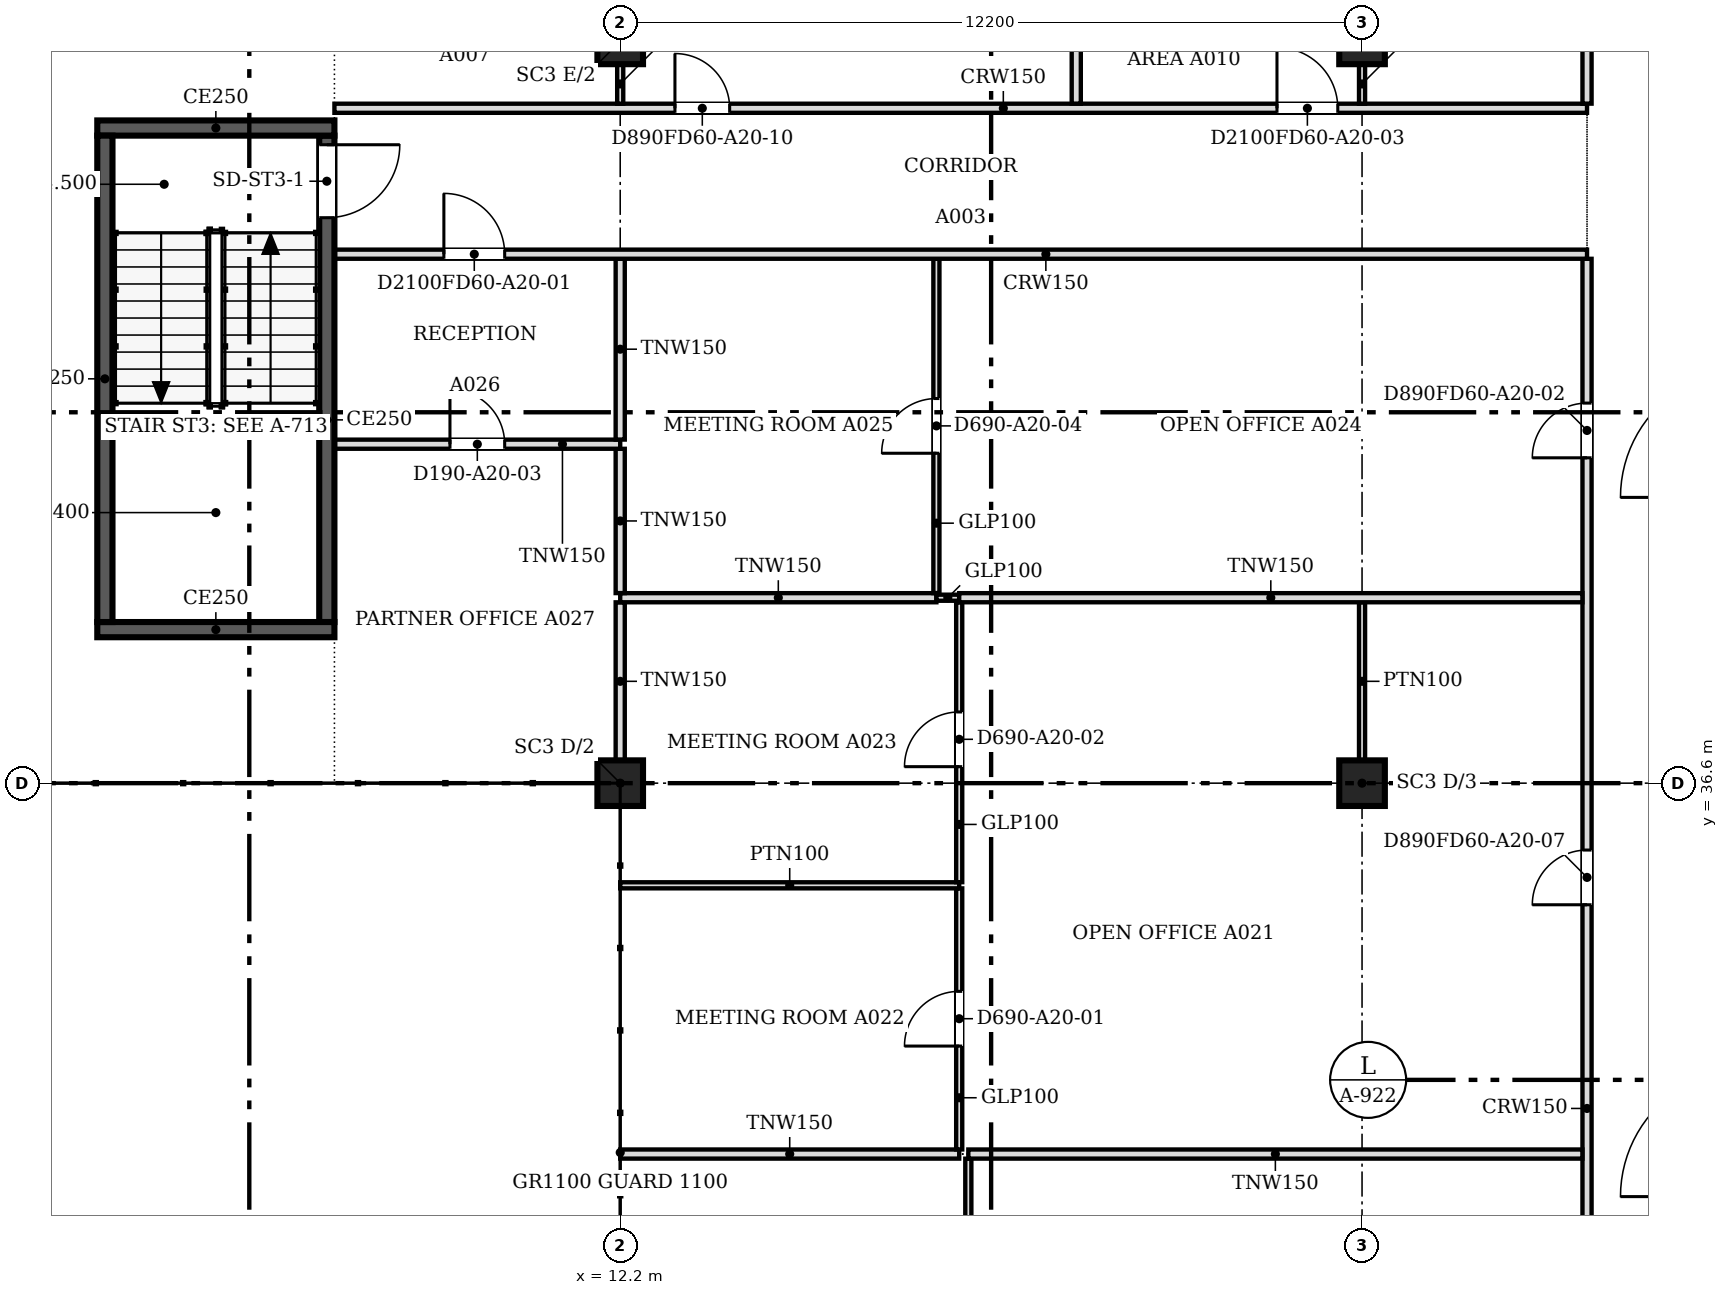
"""IFC4 building model, lengths in metres.
Left out: names, types, materials, properties, quantities, classifications, styles, units other than length and angle.
Written with IfcOpenShell. Run it as: python <this file> out.ifc"""

import sys

from ifc_helpers import new_model, si_unit, direction, frame, frame_2d, origin, origin_2d, place, context, subcontext, project, spatial, rectangle, extrude, source, transform, mapped, element, fill, save


model = new_model("IFC4")
c1 = context("Model", 3, precision=1e-05, world=origin(), true_north=direction((0.0, 1.0)))
c2 = subcontext(c1, "Body", "Model", "MODEL_VIEW")
j1 = project(units=[si_unit("LENGTHUNIT", "METRE"), si_unit("PLANEANGLEUNIT", "RADIAN")], contexts=[c1])
p1 = place(None, origin())
s1 = spatial("IfcSite", under=j1, at=p1, CompositionType="ELEMENT")
p2 = place(p1, origin())
s2 = spatial("IfcBuilding", under=s1, at=p2, CompositionType="ELEMENT")
p3 = place(p2, frame((0.0, 0.0, 220.7)))
s3 = spatial("IfcBuildingStorey", under=s2, at=p3, CompositionType="ELEMENT", Elevation=220.7)
for number, where, z_axis, x_axis in (
    (1, (12.2, 36.6, 0.0), (0.0, 0.0, 1.0), (1.0, 0.0, 0.0)),
    (2, (12.2, 48.8, 0.0), (0.0, 0.0, 1.0), (1.0, 0.0, 0.0)),
    (3, (24.4, 36.6, 0.0), (0.0, 0.0, 1.0), (1.0, 0.0, 0.0)),
    (4, (24.4, 48.8, 0.0), (0.0, 0.0, 1.0), (1.0, 0.0, 0.0)),
):
    element("IfcColumn", number, at=place(p3, frame(where, z_axis=z_axis, x_axis=x_axis)), inside=s3, PredefinedType="COLUMN", context=c2, shape_type="SweptSolid", body=[
        extrude(rectangle(XDim=0.75, YDim=0.75, at=origin_2d()), origin(), (0.0, 0.0, 1.0), 3.6),
    ])
p4 = place(p3, frame((7.5, 39.125, 0.0), z_axis=(0.0, 0.0, 1.0), x_axis=(-1.0, 0.0, 0.0)))
e5 = element("IfcWall", 5, at=p4, inside=s3, PredefinedType="SOLIDWALL", context=c2, shape_type="SweptSolid", body=[
    extrude(rectangle(XDim=3.9, YDim=0.25, at=frame_2d((1.95, 0.0))), origin(), (0.0, 0.0, 1.0), 3.8),
])
p5 = place(p3, frame((3.725, 39.25, 0.0), z_axis=(0.0, 0.0, 1.0), x_axis=(0.0, 1.0, 0.0)))
e6 = element("IfcWall", 6, at=p5, inside=s3, PredefinedType="SOLIDWALL", context=c2, shape_type="SweptSolid", body=[
    extrude(rectangle(XDim=8.0, YDim=0.25, at=frame_2d((4.0, 0.0))), origin(), (0.0, 0.0, 1.0), 3.8),
])
p6 = place(p3, frame((3.6, 47.375, 0.0), z_axis=(0.0, 0.0, 1.0), x_axis=(1.0, 0.0, 0.0)))
e7 = element("IfcWall", 7, at=p6, inside=s3, PredefinedType="SOLIDWALL", context=c2, shape_type="SweptSolid", body=[
    extrude(rectangle(XDim=3.9, YDim=0.25, at=frame_2d((1.95, 0.0))), origin(), (0.0, 0.0, 1.0), 3.8),
])
p7 = place(p3, frame((7.375, 47.25, 0.0), z_axis=(0.0, 0.0, 1.0), x_axis=(0.0, -1.0, 0.0)))
e8 = element("IfcWall", 8, at=p7, inside=s3, PredefinedType="SOLIDWALL", context=c2, shape_type="SweptSolid", body=[
    extrude(rectangle(XDim=8.0, YDim=0.25, at=frame_2d((4.0, 0.0))), origin(), (0.0, 0.0, 1.0), 3.8),
])
m1 = source(origin(), c2, "Body", "SweptSolid", [
    extrude(rectangle(XDim=1.2, YDim=2.1, at=frame_2d((0.6, 1.05))), frame((0.0, 0.135, 0.0), z_axis=(0.0, -1.0, 0.0), x_axis=(1.0, 0.0, 0.0)), (0.0, 0.0, 1.0), 0.27),
])
p8 = place(p7, frame((0.15, 0.0, 0.0)))
e9 = element("IfcOpeningElement", 9, at=p8, cuts=e8, PredefinedType="OPENING", context=c2, shape_type="MappedRepresentation", body=[
    mapped(m1, transform((0.0, 0.0, 0.0), scale=1.0)),
])
p9 = place(p3, frame((28.1, 18.8, 0.0), z_axis=(0.0, 0.0, 1.0), x_axis=(0.0, 1.0, 0.0)))
e10 = element("IfcWall", 10, at=p9, inside=s3, PredefinedType="PARTITIONING", context=c2, shape_type="SweptSolid", body=[
    extrude(rectangle(XDim=26.424, YDim=0.15, at=frame_2d((13.212, 0.0))), origin(), (0.0, 0.0, 1.0), 3.067),
])
m2 = source(origin(), c2, "Body", "SweptSolid", [
    extrude(rectangle(XDim=0.9, YDim=2.1, at=frame_2d((0.45, 1.05))), frame((0.0, 0.085, 0.0), z_axis=(0.0, -1.0, 0.0), x_axis=(1.0, 0.0, 0.0)), (0.0, 0.0, 1.0), 0.17),
])
p10 = place(p9, frame((1.1, 0.0, 0.0)))
e11 = element("IfcOpeningElement", 11, at=p10, cuts=e10, PredefinedType="OPENING", context=c2, shape_type="MappedRepresentation", body=[
    mapped(m2, transform((0.0, 0.0, 0.0), scale=1.0)),
])
p11 = place(p9, frame((23.151, 0.0, 0.0)))
e12 = element("IfcOpeningElement", 12, at=p11, cuts=e10, PredefinedType="OPENING", context=c2, shape_type="MappedRepresentation", body=[
    mapped(m2, transform((0.0, 0.0, 0.0), scale=1.0)),
])
p12 = place(p9, frame((8.2, 0.0, 0.0)))
e13 = element("IfcOpeningElement", 13, at=p12, cuts=e10, PredefinedType="OPENING", context=c2, shape_type="MappedRepresentation", body=[
    mapped(m2, transform((0.0, 0.0, 0.0), scale=1.0)),
])
p13 = place(p9, frame((15.8, 0.0, 0.0)))
e14 = element("IfcOpeningElement", 14, at=p13, cuts=e10, PredefinedType="OPENING", context=c2, shape_type="MappedRepresentation", body=[
    mapped(m2, transform((0.0, 0.0, 0.0), scale=1.0)),
])
p14 = place(p3, frame((17.925, 24.476, 0.0), z_axis=(0.0, 0.0, 1.0), x_axis=(0.0, 1.0, 0.0)))
e15 = element("IfcWall", 15, at=p14, inside=s3, PredefinedType="PARTITIONING", context=c2, shape_type="SweptSolid", body=[
    extrude(rectangle(XDim=5.948, YDim=0.1, at=frame_2d((2.974, 0.0))), origin(), (0.0, 0.0, 1.0), 3.067),
])
m3 = source(origin(), c2, "Body", "SweptSolid", [
    extrude(rectangle(XDim=0.9, YDim=2.1, at=frame_2d((0.45, 1.05))), frame((0.0, 0.06, 0.0), z_axis=(0.0, -1.0, 0.0), x_axis=(1.0, 0.0, 0.0)), (0.0, 0.0, 1.0), 0.12),
])
p15 = place(p14, frame((2.5, 0.0, 0.0)))
e16 = element("IfcOpeningElement", 16, at=p15, cuts=e15, PredefinedType="OPENING", context=c2, shape_type="MappedRepresentation", body=[
    mapped(m3, transform((0.0, 0.0, 0.0), scale=1.0)),
])
p16 = place(p3, frame((12.2, 30.5, 0.0), z_axis=(0.0, 0.0, 1.0), x_axis=(1.0, 0.0, 0.0)))
e17 = element("IfcWall", 17, at=p16, inside=s3, PredefinedType="PARTITIONING", context=c2, shape_type="SweptSolid", body=[
    extrude(rectangle(XDim=5.575, YDim=0.15, at=frame_2d((2.788, 0.0))), origin(), (0.0, 0.0, 1.0), 3.067),
])
p17 = place(p3, frame((17.925, 30.5, 0.0), z_axis=(0.0, 0.0, 1.0), x_axis=(1.0, 0.0, 0.0)))
e18 = element("IfcWall", 18, at=p17, inside=s3, PredefinedType="PARTITIONING", context=c2, shape_type="SweptSolid", body=[
    extrude(rectangle(XDim=10.099, YDim=0.15, at=frame_2d((5.049, 0.0))), origin(), (0.0, 0.0, 1.0), 3.067),
])
p18 = place(p3, frame((17.775, 30.576, 0.0), z_axis=(0.0, 0.0, 1.0), x_axis=(0.0, 1.0, 0.0)))
e19 = element("IfcWall", 19, at=p18, inside=s3, PredefinedType="PARTITIONING", context=c2, shape_type="SweptSolid", body=[
    extrude(rectangle(XDim=4.293, YDim=0.1, at=frame_2d((2.147, 0.0))), origin(), (0.0, 0.0, 1.0), 3.067),
])
p19 = place(p18, frame((1.7, 0.0, 0.0)))
e20 = element("IfcOpeningElement", 20, at=p19, cuts=e19, PredefinedType="OPENING", context=c2, shape_type="MappedRepresentation", body=[
    mapped(m3, transform((0.0, 0.0, 0.0), scale=1.0)),
])
p20 = place(p3, frame((12.2, 34.92, 0.0), z_axis=(0.0, 0.0, 1.0), x_axis=(1.0, 0.0, 0.0)))
e21 = element("IfcWall", 21, at=p20, inside=s3, PredefinedType="PARTITIONING", context=c2, shape_type="SweptSolid", body=[
    extrude(rectangle(XDim=5.575, YDim=0.1, at=frame_2d((2.788, 0.0))), origin(), (0.0, 0.0, 1.0), 3.067),
])
p21 = place(p3, frame((17.775, 34.971, 0.0), z_axis=(0.0, 0.0, 1.0), x_axis=(0.0, 1.0, 0.0)))
e22 = element("IfcWall", 22, at=p21, inside=s3, PredefinedType="PARTITIONING", context=c2, shape_type="SweptSolid", body=[
    extrude(rectangle(XDim=4.603, YDim=0.1, at=frame_2d((2.301, 0.0))), origin(), (0.0, 0.0, 1.0), 3.067),
])
p22 = place(p21, frame((1.9, 0.0, 0.0)))
e23 = element("IfcOpeningElement", 23, at=p22, cuts=e22, PredefinedType="OPENING", context=c2, shape_type="MappedRepresentation", body=[
    mapped(m3, transform((0.0, 0.0, 0.0), scale=1.0)),
])
p23 = place(p3, frame((12.2, 36.976, 0.0), z_axis=(0.0, 0.0, 1.0), x_axis=(0.0, 1.0, 0.0)))
e24 = element("IfcWall", 24, at=p23, inside=s3, PredefinedType="PARTITIONING", context=c2, shape_type="SweptSolid", body=[
    extrude(rectangle(XDim=2.598, YDim=0.15, at=frame_2d((1.299, 0.0))), origin(), (0.0, 0.0, 1.0), 3.067),
])
p24 = place(p3, frame((24.4, 36.975, 0.0), z_axis=(0.0, 0.0, 1.0), x_axis=(0.0, 1.0, 0.0)))
e25 = element("IfcWall", 25, at=p24, inside=s3, PredefinedType="PARTITIONING", context=c2, shape_type="SweptSolid", body=[
    extrude(rectangle(XDim=2.6, YDim=0.1, at=frame_2d((1.3, 0.0))), origin(), (0.0, 0.0, 1.0), 3.067),
])
p25 = place(p3, frame((12.2, 39.65, 0.0), z_axis=(0.0, 0.0, 1.0), x_axis=(1.0, 0.0, 0.0)))
e26 = element("IfcWall", 26, at=p25, inside=s3, PredefinedType="PARTITIONING", context=c2, shape_type="SweptSolid", body=[
    extrude(rectangle(XDim=5.2, YDim=0.15, at=frame_2d((2.6, 0.0))), origin(), (0.0, 0.0, 1.0), 3.067),
])
p26 = place(p3, frame((17.401, 39.65, 0.0), z_axis=(0.0, 0.0, 1.0), x_axis=(1.0, 0.0, 0.0)))
e27 = element("IfcWall", 27, at=p26, inside=s3, PredefinedType="PARTITIONING", context=c2, shape_type="SweptSolid", body=[
    extrude(rectangle(XDim=0.373, YDim=0.1, at=frame_2d((0.187, 0.0))), origin(), (0.0, 0.0, 1.0), 3.067),
])
p27 = place(p3, frame((17.775, 39.65, 0.0), z_axis=(0.0, 0.0, 1.0), x_axis=(1.0, 0.0, 0.0)))
e28 = element("IfcWall", 28, at=p27, inside=s3, PredefinedType="PARTITIONING", context=c2, shape_type="SweptSolid", body=[
    extrude(rectangle(XDim=10.249, YDim=0.15, at=frame_2d((5.125, 0.0))), origin(), (0.0, 0.0, 1.0), 3.067),
])
p28 = place(p3, frame((12.2, 39.726, 0.0), z_axis=(0.0, 0.0, 1.0), x_axis=(0.0, 1.0, 0.0)))
e29 = element("IfcWall", 29, at=p28, inside=s3, PredefinedType="PARTITIONING", context=c2, shape_type="SweptSolid", body=[
    extrude(rectangle(XDim=2.373, YDim=0.15, at=frame_2d((1.187, 0.0))), origin(), (0.0, 0.0, 1.0), 3.067),
])
p29 = place(p3, frame((17.4, 39.726, 0.0), z_axis=(0.0, 0.0, 1.0), x_axis=(0.0, 1.0, 0.0)))
e30 = element("IfcWall", 30, at=p29, inside=s3, PredefinedType="PARTITIONING", context=c2, shape_type="SweptSolid", body=[
    extrude(rectangle(XDim=5.498, YDim=0.1, at=frame_2d((2.749, 0.0))), origin(), (0.0, 0.0, 1.0), 3.067),
])
p30 = place(p29, frame((2.3, 0.0, 0.0)))
e31 = element("IfcOpeningElement", 31, at=p30, cuts=e30, PredefinedType="OPENING", context=c2, shape_type="MappedRepresentation", body=[
    mapped(m3, transform((0.0, 0.0, 0.0), scale=1.0)),
])
p31 = place(p3, frame((12.2, 42.175, 0.0), z_axis=(0.0, 0.0, 1.0), x_axis=(-1.0, 0.0, 0.0)))
e32 = element("IfcWall", 32, at=p31, inside=s3, PredefinedType="PARTITIONING", context=c2, shape_type="SweptSolid", body=[
    extrude(rectangle(XDim=4.7, YDim=0.15, at=frame_2d((2.35, 0.0))), origin(), (0.0, 0.0, 1.0), 3.067),
])
p32 = place(p31, frame((1.9, 0.0, 0.0)))
e33 = element("IfcOpeningElement", 33, at=p32, cuts=e32, PredefinedType="OPENING", context=c2, shape_type="MappedRepresentation", body=[
    mapped(m2, transform((0.0, 0.0, 0.0), scale=1.0)),
])
p33 = place(p3, frame((12.2, 42.251, 0.0), z_axis=(0.0, 0.0, 1.0), x_axis=(0.0, 1.0, 0.0)))
e34 = element("IfcWall", 34, at=p33, inside=s3, PredefinedType="PARTITIONING", context=c2, shape_type="SweptSolid", body=[
    extrude(rectangle(XDim=2.973, YDim=0.15, at=frame_2d((1.487, 0.0))), origin(), (0.0, 0.0, 1.0), 3.067),
])
p34 = place(p3, frame((28.1, 45.3, 0.0), z_axis=(0.0, 0.0, 1.0), x_axis=(-1.0, 0.0, 0.0)))
e35 = element("IfcWall", 35, at=p34, inside=s3, PredefinedType="PARTITIONING", context=c2, shape_type="SweptSolid", body=[
    extrude(rectangle(XDim=20.6, YDim=0.15, at=frame_2d((10.3, 0.0))), origin(), (0.0, 0.0, 1.0), 3.067),
])
m4 = source(origin(), c2, "Body", "SweptSolid", [
    extrude(rectangle(XDim=1.0, YDim=2.1, at=frame_2d((0.5, 1.05))), frame((0.0, 0.085, 0.0), z_axis=(0.0, -1.0, 0.0), x_axis=(1.0, 0.0, 0.0)), (0.0, 0.0, 1.0), 0.17),
])
p35 = place(p34, frame((17.8, 0.0, 0.0)))
e36 = element("IfcOpeningElement", 36, at=p35, cuts=e35, PredefinedType="OPENING", context=c2, shape_type="MappedRepresentation", body=[
    mapped(m4, transform((0.0, 0.0, 0.0), scale=1.0)),
])
p36 = place(p3, frame((7.5, 47.7, 0.0), z_axis=(0.0, 0.0, 1.0), x_axis=(1.0, 0.0, 0.0)))
e37 = element("IfcWall", 37, at=p36, inside=s3, PredefinedType="PARTITIONING", context=c2, shape_type="SweptSolid", body=[
    extrude(rectangle(XDim=20.6, YDim=0.15, at=frame_2d((10.3, 0.0))), origin(), (0.0, 0.0, 1.0), 3.067),
])
p37 = place(p36, frame((15.501, 0.0, 0.0)))
e38 = element("IfcOpeningElement", 38, at=p37, cuts=e37, PredefinedType="OPENING", context=c2, shape_type="MappedRepresentation", body=[
    mapped(m4, transform((0.0, 0.0, 0.0), scale=1.0)),
])
p38 = place(p36, frame((5.6, 0.0, 0.0)))
e39 = element("IfcOpeningElement", 39, at=p38, cuts=e37, PredefinedType="OPENING", context=c2, shape_type="MappedRepresentation", body=[
    mapped(m2, transform((0.0, 0.0, 0.0), scale=1.0)),
])
p39 = place(p3, frame((19.7, 47.776, 0.0), z_axis=(0.0, 0.0, 1.0), x_axis=(0.0, 1.0, 0.0)))
e40 = element("IfcWall", 40, at=p39, inside=s3, PredefinedType="PARTITIONING", context=c2, shape_type="SweptSolid", body=[
    extrude(rectangle(XDim=2.698, YDim=0.15, at=frame_2d((1.349, 0.0))), origin(), (0.0, 0.0, 1.0), 3.067),
])
p40 = place(p3, frame((28.1, 47.776, 0.0), z_axis=(0.0, 0.0, 1.0), x_axis=(0.0, 1.0, 0.0)))
e41 = element("IfcWall", 41, at=p40, inside=s3, PredefinedType="PARTITIONING", context=c2, shape_type="SweptSolid", body=[
    extrude(rectangle(XDim=3.348, YDim=0.15, at=frame_2d((1.674, 0.0))), origin(), (0.0, 0.0, 1.0), 3.067),
])
for number, where, z_axis, x_axis in (
    (42, (12.2, 48.425, 0.0), (0.0, 0.0, 1.0), (0.0, -1.0, 0.0)),
    (43, (24.4, 48.425, 0.0), (0.0, 0.0, 1.0), (0.0, -1.0, 0.0)),
):
    element("IfcWall", number, at=place(p3, frame(where, z_axis=z_axis, x_axis=x_axis)), inside=s3, PredefinedType="PARTITIONING", context=c2, shape_type="SweptSolid", body=[
        extrude(rectangle(XDim=0.65, YDim=0.1, at=frame_2d((0.325, 0.0))), origin(), (0.0, 0.0, 1.0), 3.067),
    ])
m5 = source(origin(), c2, "Body", "SweptSolid", [
    extrude(rectangle(XDim=1.2, YDim=2.1, at=frame_2d((0.6, 1.05))), frame((0.0, 0.025, 0.0), z_axis=(0.0, -1.0, 0.0), x_axis=(1.0, 0.0, 0.0)), (0.0, 0.0, 1.0), 0.05),
])
p41 = place(p8, origin())
e44 = element("IfcDoor", 44, at=p41, inside=s3, OperationType="SINGLE_SWING_LEFT", PredefinedType="DOOR", context=c2, shape_type="MappedRepresentation", body=[
    mapped(m5, transform((0.0, 0.0, 0.0), scale=1.0)),
])
fill(e9, e44)
m6 = source(origin(), c2, "Body", "SweptSolid", [
    extrude(rectangle(XDim=0.9, YDim=2.1, at=frame_2d((0.45, 1.05))), frame((0.0, 0.025, 0.0), z_axis=(0.0, -1.0, 0.0), x_axis=(1.0, 0.0, 0.0)), (0.0, 0.0, 1.0), 0.05),
])
p42 = place(p19, origin())
e45 = element("IfcDoor", 45, at=p42, inside=s3, OperationType="SINGLE_SWING_LEFT", PredefinedType="DOOR", context=c2, shape_type="MappedRepresentation", body=[
    mapped(m6, transform((0.0, 0.0, 0.0), scale=1.0)),
])
fill(e20, e45)
p43 = place(p22, origin())
e46 = element("IfcDoor", 46, at=p43, inside=s3, OperationType="SINGLE_SWING_LEFT", PredefinedType="DOOR", context=c2, shape_type="MappedRepresentation", body=[
    mapped(m6, transform((0.0, 0.0, 0.0), scale=1.0)),
])
fill(e23, e46)
m7 = source(origin(), c2, "Body", "SweptSolid", [
    extrude(rectangle(XDim=1.0, YDim=2.1, at=frame_2d((0.5, 1.05))), frame((0.0, 0.025, 0.0), z_axis=(0.0, -1.0, 0.0), x_axis=(1.0, 0.0, 0.0)), (0.0, 0.0, 1.0), 0.05),
])
p44 = place(p35, origin())
e47 = element("IfcDoor", 47, at=p44, inside=s3, OperationType="SINGLE_SWING_RIGHT", PredefinedType="DOOR", context=c2, shape_type="MappedRepresentation", body=[
    mapped(m7, transform((0.0, 0.0, 0.0), scale=1.0)),
])
fill(e36, e47)
p45 = place(p32, origin())
e48 = element("IfcDoor", 48, at=p45, inside=s3, OperationType="SINGLE_SWING_RIGHT", PredefinedType="DOOR", context=c2, shape_type="MappedRepresentation", body=[
    mapped(m6, transform((0.0, 0.0, 0.0), scale=1.0)),
])
fill(e33, e48)
p46 = place(p30, origin())
e49 = element("IfcDoor", 49, at=p46, inside=s3, OperationType="SINGLE_SWING_LEFT", PredefinedType="DOOR", context=c2, shape_type="MappedRepresentation", body=[
    mapped(m6, transform((0.0, 0.0, 0.0), scale=1.0)),
])
fill(e31, e49)
p47 = place(p11, origin())
e50 = element("IfcDoor", 50, at=p47, inside=s3, OperationType="SINGLE_SWING_LEFT", PredefinedType="DOOR", context=c2, shape_type="MappedRepresentation", body=[
    mapped(m6, transform((0.0, 0.0, 0.0), scale=1.0)),
])
fill(e12, e50)
p48 = place(p37, origin())
e51 = element("IfcDoor", 51, at=p48, inside=s3, OperationType="SINGLE_SWING_LEFT", PredefinedType="DOOR", context=c2, shape_type="MappedRepresentation", body=[
    mapped(m7, transform((0.0, 0.0, 0.0), scale=1.0)),
])
fill(e38, e51)
p49 = place(p13, origin())
e52 = element("IfcDoor", 52, at=p49, inside=s3, OperationType="SINGLE_SWING_LEFT", PredefinedType="DOOR", context=c2, shape_type="MappedRepresentation", body=[
    mapped(m6, transform((0.0, 0.0, 0.0), scale=1.0)),
])
fill(e14, e52)
p50 = place(p38, origin())
e53 = element("IfcDoor", 53, at=p50, inside=s3, OperationType="SINGLE_SWING_LEFT", PredefinedType="DOOR", context=c2, shape_type="MappedRepresentation", body=[
    mapped(m6, transform((0.0, 0.0, 0.0), scale=1.0)),
])
fill(e39, e53)
save(model, sys.argv[1])
